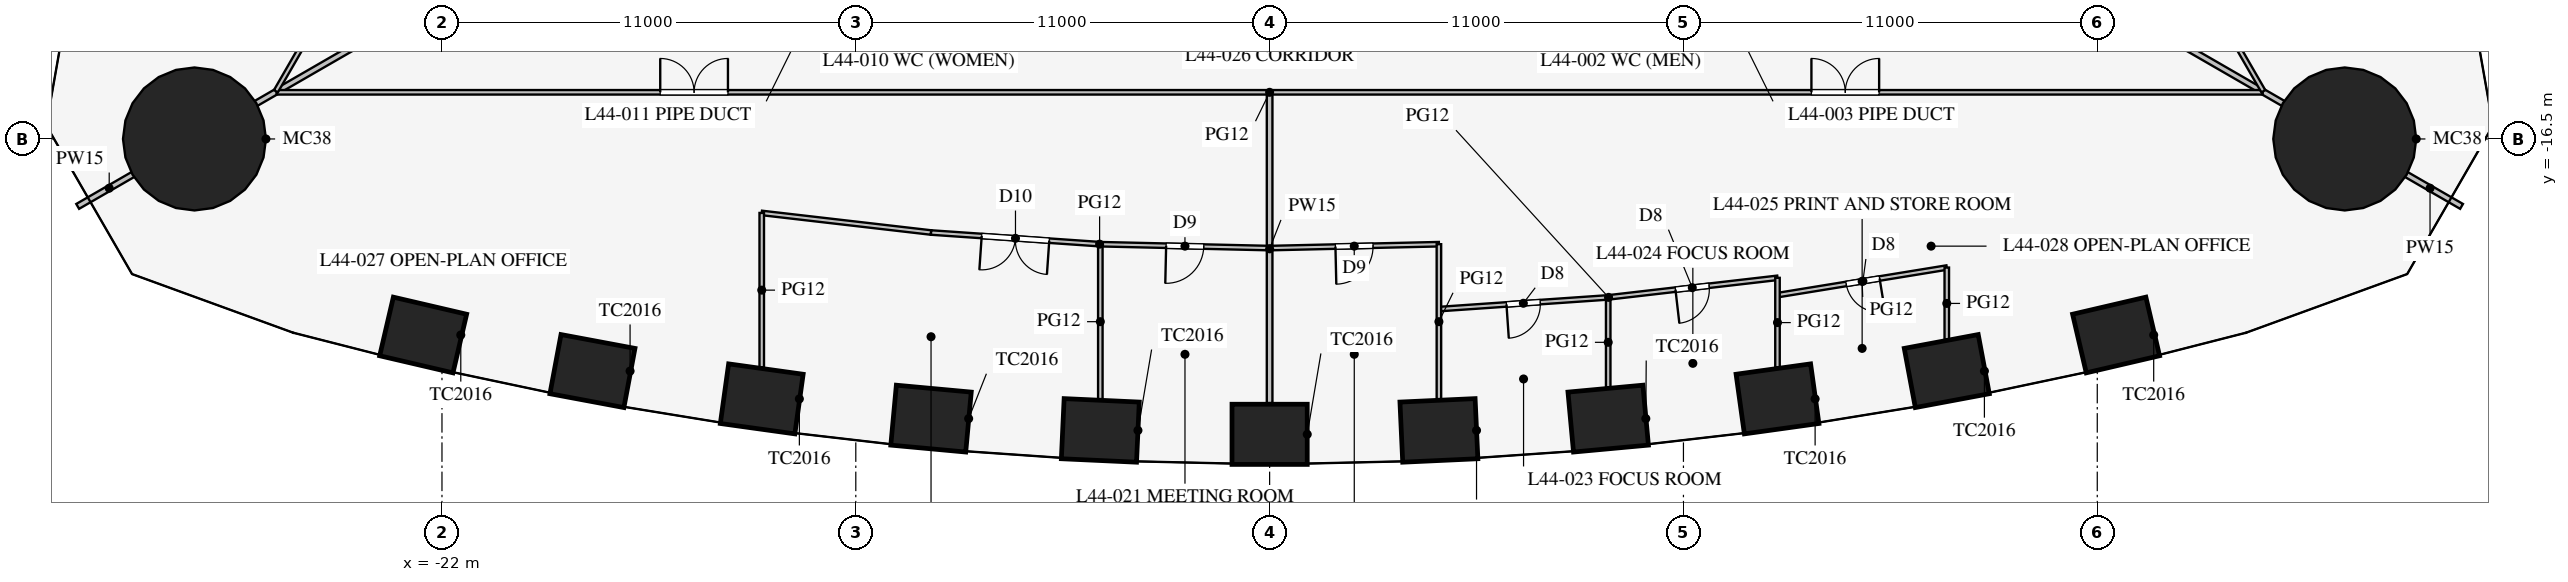
"""IFC4 building model, lengths in metres.
Left out: names, types, materials, properties, quantities, classifications, styles, units other than length and angle.
Written with IfcOpenShell. Run it as: python <this file> out.ifc"""

import sys

from ifc_helpers import new_model, si_unit, direction, frame, frame_2d, origin, origin_2d, place, context, subcontext, project, spatial, rectangle, circle, extrude, element, fill, save


model = new_model("IFC4")
c1 = context("Model", 3, precision=1e-05, world=origin(), true_north=direction((0.0, 1.0)))
c2 = subcontext(c1, "Body", "Model", "MODEL_VIEW")
j1 = project(units=[si_unit("LENGTHUNIT", "METRE"), si_unit("PLANEANGLEUNIT", "RADIAN")], contexts=[c1])
p1 = place(None, origin())
s1 = spatial("IfcSite", under=j1, at=p1, CompositionType="ELEMENT")
p2 = place(p1, origin())
s2 = spatial("IfcBuilding", under=s1, at=p2, CompositionType="ELEMENT")
p3 = place(p2, frame((0.0, 0.0, 193.9)))
s3 = spatial("IfcBuildingStorey", under=s2, at=p3, CompositionType="ELEMENT", Elevation=193.9)
for number, where, z_axis, x_axis in (
    (1, (-22.5, -21.71, 0.0), (0.0, 0.0, 1.0), (0.974, -0.227, 0.0)),
    (2, (-18.0, -22.669, 0.0), (0.0, 0.0, 1.0), (0.983, -0.184, 0.0)),
    (3, (-13.5, -23.408, 0.0), (0.0, 0.0, 1.0), (0.99, -0.138, 0.0)),
    (4, (-9.0, -23.933, 0.0), (0.0, 0.0, 1.0), (0.996, -0.092, 0.0)),
    (5, (-4.5, -24.246, 0.0), (0.0, 0.0, 1.0), (0.999, -0.046, 0.0)),
    (6, (0.0, -24.351, 0.0), (0.0, 0.0, 1.0), (1.0, 0.0, 0.0)),
    (7, (4.5, -24.246, 0.0), (0.0, 0.0, 1.0), (0.999, 0.046, 0.0)),
    (8, (9.0, -23.933, 0.0), (0.0, 0.0, 1.0), (0.996, 0.092, 0.0)),
    (9, (13.5, -23.408, 0.0), (0.0, 0.0, 1.0), (0.99, 0.138, 0.0)),
    (10, (18.0, -22.669, 0.0), (0.0, 0.0, 1.0), (0.983, 0.184, 0.0)),
    (11, (22.5, -21.71, 0.0), (0.0, 0.0, 1.0), (0.974, 0.227, 0.0)),
):
    element("IfcColumn", number, at=place(p3, frame(where, z_axis=z_axis, x_axis=x_axis)), inside=s3, PredefinedType="COLUMN", context=c2, shape_type="SweptSolid", body=[
        extrude(rectangle(XDim=2.0, YDim=1.6, at=origin_2d()), origin(), (0.0, 0.0, 1.0), 4.2),
    ])
for number, where, z_axis, x_axis in (
    (12, (28.579, -16.5, 0.0), (0.0, 0.0, 1.0), (1.0, 0.0, 0.0)),
    (13, (-28.579, -16.5, 0.0), (0.0, 0.0, 1.0), (1.0, 0.0, 0.0)),
):
    element("IfcColumn", number, at=place(p3, frame(where, z_axis=z_axis, x_axis=x_axis)), inside=s3, PredefinedType="COLUMN", context=c2, shape_type="SweptSolid", body=[
        extrude(circle(Radius=1.9, at=origin_2d()), origin(), (0.0, 0.0, 1.0), 4.2),
    ])
p4 = place(p3, frame((14.203, -8.2, 0.0), z_axis=(0.0, 0.0, 1.0), x_axis=(0.866021600284, -0.500006587798, 0.0)))
e14 = element("IfcWall", 14, at=p4, inside=s3, PredefinedType="PARTITIONING", context=c2, shape_type="SweptSolid", body=[
    extrude(rectangle(XDim=14.95, YDim=0.15, at=frame_2d((7.475, 0.0))), origin(), (0.0, 0.0, 1.0), 2.4),
])
p5 = place(p3, frame((30.008, -17.325, 0.0), z_axis=(0.0, 0.0, 1.0), x_axis=(0.866013246922, -0.500021055713, 0.0)))
e15 = element("IfcWall", 15, at=p5, inside=s3, PredefinedType="PARTITIONING", context=c2, shape_type="SweptSolid", body=[
    extrude(rectangle(XDim=1.935, YDim=0.15, at=frame_2d((0.967, 0.0))), origin(), (0.0, 0.0, 1.0), 2.4),
])
p6 = place(p3, frame((-14.203, -8.2, 0.0), z_axis=(0.0, 0.0, 1.0), x_axis=(-0.866021600284, -0.500006587798, 0.0)))
e16 = element("IfcWall", 16, at=p6, inside=s3, PredefinedType="PARTITIONING", context=c2, shape_type="SweptSolid", body=[
    extrude(rectangle(XDim=14.95, YDim=0.15, at=frame_2d((7.475, 0.0))), origin(), (0.0, 0.0, 1.0), 2.4),
])
p7 = place(p3, frame((-30.008, -17.325, 0.0), z_axis=(0.0, 0.0, 1.0), x_axis=(-0.866013246922, -0.500021055713, 0.0)))
e17 = element("IfcWall", 17, at=p7, inside=s3, PredefinedType="PARTITIONING", context=c2, shape_type="SweptSolid", body=[
    extrude(rectangle(XDim=1.935, YDim=0.15, at=frame_2d((0.967, 0.0))), origin(), (0.0, 0.0, 1.0), 2.4),
])
p8 = place(p3, frame((0.0, -15.32, 0.0), z_axis=(0.0, 0.0, 1.0), x_axis=(0.0, -1.0, 0.0)))
e18 = element("IfcWall", 18, at=p8, inside=s3, PredefinedType="PARTITIONING", context=c2, shape_type="SweptSolid", body=[
    extrude(rectangle(XDim=8.201, YDim=0.15, at=frame_2d((4.1, 0.0))), origin(), (0.0, 0.0, 1.0), 2.992),
])
p9 = place(p3, frame((-26.398, -15.26, 0.0), z_axis=(0.0, 0.0, 1.0), x_axis=(1.0, 0.0, 0.0)))
e19 = element("IfcWall", 19, at=p9, inside=s3, PredefinedType="PARTITIONING", context=c2, shape_type="SweptSolid", body=[
    extrude(rectangle(XDim=52.796, YDim=0.12, at=frame_2d((26.398, 0.0))), origin(), (0.0, 0.0, 1.0), 2.9),
])
p10 = place(p9, frame((10.2, 0.0, 0.15)))
e20 = element("IfcOpeningElement", 20, at=p10, cuts=e19, PredefinedType="OPENING", context=c2, shape_type="SweptSolid", body=[
    extrude(rectangle(XDim=1.8, YDim=2.1, at=frame_2d((0.9, 1.05))), frame((0.0, 0.07, 0.0), z_axis=(0.0, -1.0, 0.0), x_axis=(1.0, 0.0, 0.0)), (0.0, 0.0, 1.0), 0.14),
])
p11 = place(p9, frame((40.8, 0.0, 0.15)))
e21 = element("IfcOpeningElement", 21, at=p11, cuts=e19, PredefinedType="OPENING", context=c2, shape_type="SweptSolid", body=[
    extrude(rectangle(XDim=1.8, YDim=2.1, at=frame_2d((0.9, 1.05))), frame((0.0, 0.07, 0.0), z_axis=(0.0, -1.0, 0.0), x_axis=(1.0, 0.0, 0.0)), (0.0, 0.0, 1.0), 0.14),
])
p12 = place(p3, frame((0.0, -19.401, 0.0), z_axis=(0.0, 0.0, 1.0), x_axis=(0.99973552509, 0.022997388381, 0.0)))
e22 = element("IfcWall", 22, at=p12, inside=s3, PredefinedType="PARTITIONING", context=c2, shape_type="SweptSolid", body=[
    extrude(rectangle(XDim=4.501, YDim=0.12, at=frame_2d((2.25, 0.0))), origin(), (0.0, 0.0, 1.0), 2.9),
])
p13 = place(p12, frame((1.75, 0.0, 0.15)))
e23 = element("IfcOpeningElement", 23, at=p13, cuts=e22, PredefinedType="OPENING", context=c2, shape_type="SweptSolid", body=[
    extrude(rectangle(XDim=1.0, YDim=2.1, at=frame_2d((0.5, 1.05))), frame((0.0, 0.07, 0.0), z_axis=(0.0, -1.0, 0.0), x_axis=(1.0, 0.0, 0.0)), (0.0, 0.0, 1.0), 0.14),
])
p14 = place(p3, frame((13.5, -20.651, 0.0), z_axis=(0.0, 0.0, 1.0), x_axis=(0.986986525477, 0.160802980469, 0.0)))
e24 = element("IfcWall", 24, at=p14, inside=s3, PredefinedType="PARTITIONING", context=c2, shape_type="SweptSolid", body=[
    extrude(rectangle(XDim=4.559, YDim=0.12, at=frame_2d((2.28, 0.0))), origin(), (0.0, 0.0, 1.0), 2.9),
])
p15 = place(p14, frame((1.85, 0.0, 0.15)))
e25 = element("IfcOpeningElement", 25, at=p15, cuts=e24, PredefinedType="OPENING", context=c2, shape_type="SweptSolid", body=[
    extrude(rectangle(XDim=0.9, YDim=2.1, at=frame_2d((0.45, 1.05))), frame((0.0, 0.07, 0.0), z_axis=(0.0, -1.0, 0.0), x_axis=(1.0, 0.0, 0.0)), (0.0, 0.0, 1.0), 0.14),
])
p16 = place(p3, frame((4.5, -21.022, 0.0), z_axis=(0.0, 0.0, 1.0), x_axis=(0.997623533978, 0.068900540297, 0.0)))
e26 = element("IfcWall", 26, at=p16, inside=s3, PredefinedType="PARTITIONING", context=c2, shape_type="SweptSolid", body=[
    extrude(rectangle(XDim=4.511, YDim=0.12, at=frame_2d((2.255, 0.0))), origin(), (0.0, 0.0, 1.0), 2.9),
])
p17 = place(p16, frame((1.8, 0.0, 0.15)))
e27 = element("IfcOpeningElement", 27, at=p17, cuts=e26, PredefinedType="OPENING", context=c2, shape_type="SweptSolid", body=[
    extrude(rectangle(XDim=0.9, YDim=2.1, at=frame_2d((0.45, 1.05))), frame((0.0, 0.07, 0.0), z_axis=(0.0, -1.0, 0.0), x_axis=(1.0, 0.0, 0.0)), (0.0, 0.0, 1.0), 0.14),
])
p18 = place(p3, frame((9.0, -20.711, 0.0), z_axis=(0.0, 0.0, 1.0), x_axis=(0.993382946625, 0.114849124309, 0.0)))
e28 = element("IfcWall", 28, at=p18, inside=s3, PredefinedType="PARTITIONING", context=c2, shape_type="SweptSolid", body=[
    extrude(rectangle(XDim=4.53, YDim=0.12, at=frame_2d((2.265, 0.0))), origin(), (0.0, 0.0, 1.0), 2.9),
])
p19 = place(p18, frame((1.8, 0.0, 0.15)))
e29 = element("IfcOpeningElement", 29, at=p19, cuts=e28, PredefinedType="OPENING", context=c2, shape_type="SweptSolid", body=[
    extrude(rectangle(XDim=0.9, YDim=2.1, at=frame_2d((0.45, 1.05))), frame((0.0, 0.07, 0.0), z_axis=(0.0, -1.0, 0.0), x_axis=(1.0, 0.0, 0.0)), (0.0, 0.0, 1.0), 0.14),
])
p20 = place(p3, frame((-13.5, -18.466, 0.0), z_axis=(0.0, 0.0, 1.0), x_axis=(0.993382946625, -0.114849124309, 0.0)))
e30 = element("IfcWall", 30, at=p20, inside=s3, PredefinedType="PARTITIONING", context=c2, shape_type="SweptSolid", body=[
    extrude(rectangle(XDim=4.53, YDim=0.12, at=frame_2d((2.265, 0.0))), origin(), (0.0, 0.0, 1.0), 2.9),
])
p21 = place(p3, frame((-4.5, -19.297, 0.0), z_axis=(0.0, 0.0, 1.0), x_axis=(0.99973552509, -0.022997388381, 0.0)))
e31 = element("IfcWall", 31, at=p21, inside=s3, PredefinedType="PARTITIONING", context=c2, shape_type="SweptSolid", body=[
    extrude(rectangle(XDim=4.501, YDim=0.12, at=frame_2d((2.25, 0.0))), origin(), (0.0, 0.0, 1.0), 2.9),
])
p22 = place(p21, frame((1.75, 0.0, 0.15)))
e32 = element("IfcOpeningElement", 32, at=p22, cuts=e31, PredefinedType="OPENING", context=c2, shape_type="SweptSolid", body=[
    extrude(rectangle(XDim=1.0, YDim=2.1, at=frame_2d((0.5, 1.05))), frame((0.0, 0.07, 0.0), z_axis=(0.0, -1.0, 0.0), x_axis=(1.0, 0.0, 0.0)), (0.0, 0.0, 1.0), 0.14),
])
p23 = place(p3, frame((-9.0, -18.986, 0.0), z_axis=(0.0, 0.0, 1.0), x_axis=(0.997623533978, -0.068900540297, 0.0)))
e33 = element("IfcWall", 33, at=p23, inside=s3, PredefinedType="PARTITIONING", context=c2, shape_type="SweptSolid", body=[
    extrude(rectangle(XDim=4.511, YDim=0.12, at=frame_2d((2.255, 0.0))), origin(), (0.0, 0.0, 1.0), 2.9),
])
p24 = place(p23, frame((1.35, 0.0, 0.15)))
e34 = element("IfcOpeningElement", 34, at=p24, cuts=e33, PredefinedType="OPENING", context=c2, shape_type="SweptSolid", body=[
    extrude(rectangle(XDim=1.8, YDim=2.1, at=frame_2d((0.9, 1.05))), frame((0.0, 0.07, 0.0), z_axis=(0.0, -1.0, 0.0), x_axis=(1.0, 0.0, 0.0)), (0.0, 0.0, 1.0), 0.14),
])
p25 = place(p3, frame((13.5, -20.191, 0.0), z_axis=(0.0, 0.0, 1.0), x_axis=(0.0, -1.0, 0.0)))
e35 = element("IfcWall", 35, at=p25, inside=s3, PredefinedType="PARTITIONING", context=c2, shape_type="SweptSolid", body=[
    extrude(rectangle(XDim=2.379, YDim=0.12, at=frame_2d((1.19, 0.0))), origin(), (0.0, 0.0, 1.0), 2.8),
])
p26 = place(p3, frame((18.0, -19.918, 0.0), z_axis=(0.0, 0.0, 1.0), x_axis=(0.0, -1.0, 0.0)))
e36 = element("IfcWall", 36, at=p26, inside=s3, PredefinedType="PARTITIONING", context=c2, shape_type="SweptSolid", body=[
    extrude(rectangle(XDim=1.907, YDim=0.12, at=frame_2d((0.954, 0.0))), origin(), (0.0, 0.0, 1.0), 2.8),
])
p27 = place(p3, frame((4.5, -19.297, 0.0), z_axis=(0.0, 0.0, 1.0), x_axis=(0.0, -1.0, 0.0)))
e37 = element("IfcWall", 37, at=p27, inside=s3, PredefinedType="PARTITIONING", context=c2, shape_type="SweptSolid", body=[
    extrude(rectangle(XDim=4.118, YDim=0.12, at=frame_2d((2.059, 0.0))), origin(), (0.0, 0.0, 1.0), 2.9),
])
p28 = place(p3, frame((9.0, -20.711, 0.0), z_axis=(0.0, 0.0, 1.0), x_axis=(0.0, -1.0, 0.0)))
e38 = element("IfcWall", 38, at=p28, inside=s3, PredefinedType="PARTITIONING", context=c2, shape_type="SweptSolid", body=[
    extrude(rectangle(XDim=2.388, YDim=0.12, at=frame_2d((1.194, 0.0))), origin(), (0.0, 0.0, 1.0), 2.9),
])
p29 = place(p3, frame((-13.5, -18.466, 0.0), z_axis=(0.0, 0.0, 1.0), x_axis=(0.0, -1.0, 0.0)))
e39 = element("IfcWall", 39, at=p29, inside=s3, PredefinedType="PARTITIONING", context=c2, shape_type="SweptSolid", body=[
    extrude(rectangle(XDim=4.104, YDim=0.12, at=frame_2d((2.052, 0.0))), origin(), (0.0, 0.0, 1.0), 2.8),
])
p30 = place(p3, frame((-4.5, -19.297, 0.0), z_axis=(0.0, 0.0, 1.0), x_axis=(0.0, -1.0, 0.0)))
e40 = element("IfcWall", 40, at=p30, inside=s3, PredefinedType="PARTITIONING", context=c2, shape_type="SweptSolid", body=[
    extrude(rectangle(XDim=4.118, YDim=0.12, at=frame_2d((2.059, 0.0))), origin(), (0.0, 0.0, 1.0), 2.9),
])
p31 = place(p3, frame((26.415, -15.231, 0.0), z_axis=(0.0, 0.0, 1.0), x_axis=(-0.50000091641, 0.866024874695, 0.0)))
e41 = element("IfcWall", 41, at=p31, inside=s3, PredefinedType="PARTITIONING", context=c2, shape_type="SweptSolid", body=[
    extrude(rectangle(XDim=52.796, YDim=0.12, at=frame_2d((26.398, 0.0))), origin(), (0.0, 0.0, 1.0), 2.9),
])
p32 = place(p31, frame((10.2, 0.0, 0.15)))
e42 = element("IfcOpeningElement", 42, at=p32, cuts=e41, PredefinedType="OPENING", context=c2, shape_type="SweptSolid", body=[
    extrude(rectangle(XDim=1.8, YDim=2.1, at=frame_2d((0.9, 1.05))), frame((0.0, 0.07, 0.0), z_axis=(0.0, -1.0, 0.0), x_axis=(1.0, 0.0, 0.0)), (0.0, 0.0, 1.0), 0.14),
])
p33 = place(p31, frame((40.8, 0.0, 0.15)))
e43 = element("IfcOpeningElement", 43, at=p33, cuts=e41, PredefinedType="OPENING", context=c2, shape_type="SweptSolid", body=[
    extrude(rectangle(XDim=1.8, YDim=2.1, at=frame_2d((0.9, 1.05))), frame((0.0, 0.07, 0.0), z_axis=(0.0, -1.0, 0.0), x_axis=(1.0, 0.0, 0.0)), (0.0, 0.0, 1.0), 0.14),
])
p34 = place(p3, frame((-0.016, 30.491, 0.0), z_axis=(0.0, 0.0, 1.0), x_axis=(-0.50000091641, -0.866024874695, 0.0)))
e44 = element("IfcWall", 44, at=p34, inside=s3, PredefinedType="PARTITIONING", context=c2, shape_type="SweptSolid", body=[
    extrude(rectangle(XDim=52.796, YDim=0.12, at=frame_2d((26.398, 0.0))), origin(), (0.0, 0.0, 1.0), 2.9),
])
p35 = place(p34, frame((10.2, 0.0, 0.15)))
e45 = element("IfcOpeningElement", 45, at=p35, cuts=e44, PredefinedType="OPENING", context=c2, shape_type="SweptSolid", body=[
    extrude(rectangle(XDim=1.8, YDim=2.1, at=frame_2d((0.9, 1.05))), frame((0.0, 0.07, 0.0), z_axis=(0.0, -1.0, 0.0), x_axis=(1.0, 0.0, 0.0)), (0.0, 0.0, 1.0), 0.14),
])
p36 = place(p34, frame((40.8, 0.0, 0.15)))
e46 = element("IfcOpeningElement", 46, at=p36, cuts=e44, PredefinedType="OPENING", context=c2, shape_type="SweptSolid", body=[
    extrude(rectangle(XDim=1.8, YDim=2.1, at=frame_2d((0.9, 1.05))), frame((0.0, 0.07, 0.0), z_axis=(0.0, -1.0, 0.0), x_axis=(1.0, 0.0, 0.0)), (0.0, 0.0, 1.0), 0.14),
])
p37 = place(p24, frame((1.8, 0.0, 0.0), z_axis=(0.0, 0.0, 1.0), x_axis=(-1.0, 0.0, 0.0)))
e47 = element("IfcDoor", 47, at=p37, inside=s3, OperationType="DOUBLE_DOOR_SINGLE_SWING", PredefinedType="DOOR", context=c2, shape_type="SweptSolid", body=[
    extrude(rectangle(XDim=1.8, YDim=2.1, at=frame_2d((0.9, 1.05))), frame((0.0, 0.025, 0.0), z_axis=(0.0, -1.0, 0.0), x_axis=(1.0, 0.0, 0.0)), (0.0, 0.0, 1.0), 0.05),
])
fill(e34, e47)
p38 = place(p22, frame((1.0, 0.0, 0.0), z_axis=(0.0, 0.0, 1.0), x_axis=(-1.0, 0.0, 0.0)))
e48 = element("IfcDoor", 48, at=p38, inside=s3, OperationType="SINGLE_SWING_RIGHT", PredefinedType="DOOR", context=c2, shape_type="SweptSolid", body=[
    extrude(rectangle(XDim=1.0, YDim=2.1, at=frame_2d((0.5, 1.05))), frame((0.0, 0.025, 0.0), z_axis=(0.0, -1.0, 0.0), x_axis=(1.0, 0.0, 0.0)), (0.0, 0.0, 1.0), 0.05),
])
fill(e32, e48)
p39 = place(p13, frame((1.0, 0.0, 0.0), z_axis=(0.0, 0.0, 1.0), x_axis=(-1.0, 0.0, 0.0)))
e49 = element("IfcDoor", 49, at=p39, inside=s3, OperationType="SINGLE_SWING_RIGHT", PredefinedType="DOOR", context=c2, shape_type="SweptSolid", body=[
    extrude(rectangle(XDim=1.0, YDim=2.1, at=frame_2d((0.5, 1.05))), frame((0.0, 0.025, 0.0), z_axis=(0.0, -1.0, 0.0), x_axis=(1.0, 0.0, 0.0)), (0.0, 0.0, 1.0), 0.05),
])
fill(e23, e49)
p40 = place(p17, frame((0.9, 0.0, 0.0), z_axis=(0.0, 0.0, 1.0), x_axis=(-1.0, 0.0, 0.0)))
e50 = element("IfcDoor", 50, at=p40, inside=s3, OperationType="SINGLE_SWING_RIGHT", PredefinedType="DOOR", context=c2, shape_type="SweptSolid", body=[
    extrude(rectangle(XDim=0.9, YDim=2.1, at=frame_2d((0.45, 1.05))), frame((0.0, 0.025, 0.0), z_axis=(0.0, -1.0, 0.0), x_axis=(1.0, 0.0, 0.0)), (0.0, 0.0, 1.0), 0.05),
])
fill(e27, e50)
p41 = place(p19, frame((0.9, 0.0, 0.0), z_axis=(0.0, 0.0, 1.0), x_axis=(-1.0, 0.0, 0.0)))
e51 = element("IfcDoor", 51, at=p41, inside=s3, OperationType="SINGLE_SWING_RIGHT", PredefinedType="DOOR", context=c2, shape_type="SweptSolid", body=[
    extrude(rectangle(XDim=0.9, YDim=2.1, at=frame_2d((0.45, 1.05))), frame((0.0, 0.025, 0.0), z_axis=(0.0, -1.0, 0.0), x_axis=(1.0, 0.0, 0.0)), (0.0, 0.0, 1.0), 0.05),
])
fill(e29, e51)
p42 = place(p15, frame((0.9, 0.0, 0.0), z_axis=(0.0, 0.0, 1.0), x_axis=(-1.0, 0.0, 0.0)))
e52 = element("IfcDoor", 52, at=p42, inside=s3, OperationType="SINGLE_SWING_LEFT", PredefinedType="DOOR", context=c2, shape_type="SweptSolid", body=[
    extrude(rectangle(XDim=0.9, YDim=2.1, at=frame_2d((0.45, 1.05))), frame((0.0, 0.025, 0.0), z_axis=(0.0, -1.0, 0.0), x_axis=(1.0, 0.0, 0.0)), (0.0, 0.0, 1.0), 0.05),
])
fill(e25, e52)
p43 = place(p10, origin())
e53 = element("IfcDoor", 53, at=p43, inside=s3, OperationType="DOUBLE_DOOR_SINGLE_SWING", PredefinedType="DOOR", context=c2, shape_type="SweptSolid", body=[
    extrude(rectangle(XDim=1.8, YDim=2.1, at=frame_2d((0.9, 1.05))), frame((0.0, 0.025, 0.0), z_axis=(0.0, -1.0, 0.0), x_axis=(1.0, 0.0, 0.0)), (0.0, 0.0, 1.0), 0.05),
])
fill(e20, e53)
p44 = place(p11, origin())
e54 = element("IfcDoor", 54, at=p44, inside=s3, OperationType="DOUBLE_DOOR_SINGLE_SWING", PredefinedType="DOOR", context=c2, shape_type="SweptSolid", body=[
    extrude(rectangle(XDim=1.8, YDim=2.1, at=frame_2d((0.9, 1.05))), frame((0.0, 0.025, 0.0), z_axis=(0.0, -1.0, 0.0), x_axis=(1.0, 0.0, 0.0)), (0.0, 0.0, 1.0), 0.05),
])
fill(e21, e54)
save(model, sys.argv[1])
